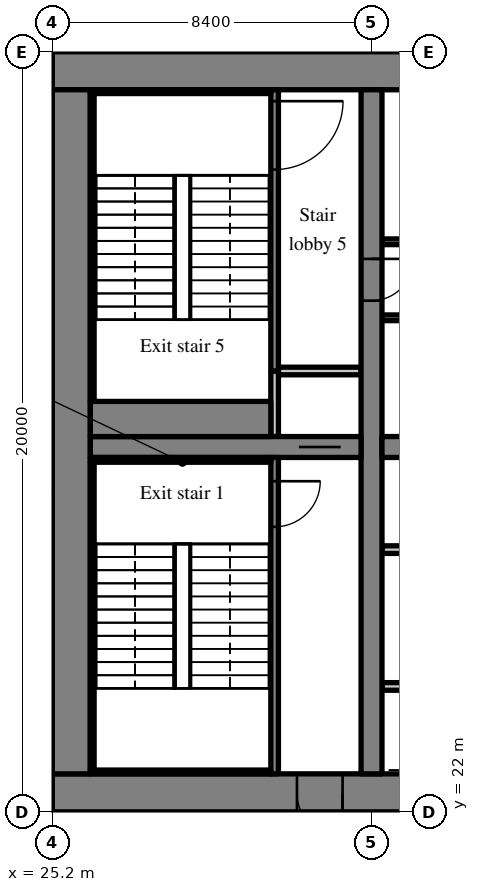
"""IFC4 building model, lengths in metres.
Left out: names, types, materials, properties, quantities, classifications, styles, units other than length and angle.
Written with IfcOpenShell. Run it as: python <this file> out.ifc"""

import sys

from ifc_helpers import new_model, si_unit, direction, frame, frame_2d, origin, place, context, subcontext, project, spatial, rectangle, extrude, source, transform, mapped, element, fill, save


model = new_model("IFC4")
c1 = context("Model", 3, precision=1e-05, world=origin(), true_north=direction((0.0, 1.0)))
c2 = subcontext(c1, "Body", "Model", "MODEL_VIEW")
j1 = project(units=[si_unit("LENGTHUNIT", "METRE"), si_unit("PLANEANGLEUNIT", "RADIAN")], contexts=[c1])
p1 = place(None, origin())
s1 = spatial("IfcSite", under=j1, at=p1, CompositionType="ELEMENT")
p2 = place(p1, origin())
s2 = spatial("IfcBuilding", under=s1, at=p2, CompositionType="ELEMENT")
p3 = place(p2, frame((0.0, 0.0, 54.4)))
s3 = spatial("IfcBuildingStorey", under=s2, at=p3, CompositionType="ELEMENT", Elevation=54.4)
m1 = source(origin(), c2, "Body", "SweptSolid", [
    extrude(rectangle(XDim=50.4, YDim=1.0, at=frame_2d((25.2, 0.0))), origin(), (0.0, 0.0, 1.0), 3.52),
])
p4 = place(p3, frame((25.2, 22.5, 0.0), z_axis=(0.0, 0.0, 1.0), x_axis=(1.0, 0.0, 0.0)))
e1 = element("IfcWall", 1, at=p4, inside=s3, PredefinedType="SHEAR", context=c2, shape_type="MappedRepresentation", body=[
    mapped(m1, transform((0.0, 0.0, 0.0), scale=1.0)),
])
m2 = source(origin(), c2, "Body", "SweptSolid", [
    extrude(rectangle(XDim=1.8, YDim=2.1, at=frame_2d((0.9, 1.05))), frame((0.0, 0.51, 0.0), z_axis=(0.0, -1.0, 0.0), x_axis=(1.0, 0.0, 0.0)), (0.0, 0.0, 1.0), 1.02),
])
p5 = place(p4, frame((15.9, 0.0, 0.0)))
e2 = element("IfcOpeningElement", 2, at=p5, cuts=e1, PredefinedType="OPENING", context=c2, shape_type="MappedRepresentation", body=[
    mapped(m2, transform((0.0, 0.0, 0.0), scale=1.0)),
])
m3 = source(origin(), c2, "Body", "SweptSolid", [
    extrude(rectangle(XDim=1.2, YDim=2.1, at=frame_2d((0.6, 1.05))), frame((0.0, 0.51, 0.0), z_axis=(0.0, -1.0, 0.0), x_axis=(1.0, 0.0, 0.0)), (0.0, 0.0, 1.0), 1.02),
])
p6 = place(p4, frame((26.987, 0.0, 0.0)))
e3 = element("IfcOpeningElement", 3, at=p6, cuts=e1, PredefinedType="OPENING", context=c2, shape_type="MappedRepresentation", body=[
    mapped(m3, transform((0.0, 0.0, 0.0), scale=1.0)),
])
m4 = source(origin(), c2, "Body", "SweptSolid", [
    extrude(rectangle(XDim=0.9, YDim=2.1, at=frame_2d((0.45, 1.05))), frame((0.0, 0.51, 0.0), z_axis=(0.0, -1.0, 0.0), x_axis=(1.0, 0.0, 0.0)), (0.0, 0.0, 1.0), 1.02),
])
p7 = place(p4, frame((33.75, 0.0, 0.0)))
e4 = element("IfcOpeningElement", 4, at=p7, cuts=e1, PredefinedType="OPENING", context=c2, shape_type="MappedRepresentation", body=[
    mapped(m4, transform((0.0, 0.0, 0.0), scale=1.0)),
])
p8 = place(p4, frame((30.75, 0.0, 0.0)))
e5 = element("IfcOpeningElement", 5, at=p8, cuts=e1, PredefinedType="OPENING", context=c2, shape_type="MappedRepresentation", body=[
    mapped(m4, transform((0.0, 0.0, 0.0), scale=1.0)),
])
p9 = place(p4, frame((38.262, 0.0, 0.0)))
e6 = element("IfcOpeningElement", 6, at=p9, cuts=e1, PredefinedType="OPENING", context=c2, shape_type="MappedRepresentation", body=[
    mapped(m4, transform((0.0, 0.0, 0.0), scale=1.0)),
])
p10 = place(p4, frame((6.438, 0.0, 0.0)))
e7 = element("IfcOpeningElement", 7, at=p10, cuts=e1, PredefinedType="OPENING", context=c2, shape_type="MappedRepresentation", body=[
    mapped(m3, transform((0.0, 0.0, 0.0), scale=1.0)),
])
p11 = place(p4, frame((47.725, 0.0, 0.0)))
e8 = element("IfcOpeningElement", 8, at=p11, cuts=e1, PredefinedType="OPENING", context=c2, shape_type="MappedRepresentation", body=[
    mapped(m3, transform((0.0, 0.0, 0.0), scale=1.0)),
])
p12 = place(p3, frame((25.2, 41.5, 0.0), z_axis=(0.0, 0.0, 1.0), x_axis=(1.0, 0.0, 0.0)))
e9 = element("IfcWall", 9, at=p12, inside=s3, PredefinedType="SHEAR", context=c2, shape_type="MappedRepresentation", body=[
    mapped(m1, transform((0.0, 0.0, 0.0), scale=1.0)),
])
m5 = source(origin(), c2, "Body", "SweptSolid", [
    extrude(rectangle(XDim=18.0, YDim=1.0, at=frame_2d((9.0, 0.0))), origin(), (0.0, 0.0, 1.0), 3.52),
])
p13 = place(p3, frame((25.7, 23.0, 0.0), z_axis=(0.0, 0.0, 1.0), x_axis=(0.0, 1.0, 0.0)))
e10 = element("IfcWall", 10, at=p13, inside=s3, PredefinedType="SHEAR", context=c2, shape_type="MappedRepresentation", body=[
    mapped(m5, transform((0.0, 0.0, 0.0), scale=1.0)),
])
m6 = source(origin(), c2, "Body", "SweptSolid", [
    extrude(rectangle(XDim=18.0, YDim=0.55, at=frame_2d((9.0, 0.0))), origin(), (0.0, 0.0, 1.0), 3.52),
])
p14 = place(p3, frame((33.6, 23.0, 0.0), z_axis=(0.0, 0.0, 1.0), x_axis=(0.0, 1.0, 0.0)))
e11 = element("IfcWall", 11, at=p14, inside=s3, PredefinedType="SHEAR", context=c2, shape_type="MappedRepresentation", body=[
    mapped(m6, transform((0.0, 0.0, 0.0), scale=1.0)),
])
m7 = source(origin(), c2, "Body", "SweptSolid", [
    extrude(rectangle(XDim=1.1, YDim=2.1, at=frame_2d((0.55, 1.05))), frame((0.0, 0.285, 0.0), z_axis=(0.0, -1.0, 0.0), x_axis=(1.0, 0.0, 0.0)), (0.0, 0.0, 1.0), 0.57),
])
p15 = place(p14, frame((12.45, 0.0, 0.0)))
e12 = element("IfcOpeningElement", 12, at=p15, cuts=e11, PredefinedType="OPENING", context=c2, shape_type="MappedRepresentation", body=[
    mapped(m7, transform((0.0, 0.0, 0.0), scale=1.0)),
])
m8 = source(origin(), c2, "Body", "SweptSolid", [
    extrude(rectangle(XDim=7.125, YDim=0.55, at=frame_2d((3.562, 0.0))), origin(), (0.0, 0.0, 1.0), 3.52),
])
p16 = place(p3, frame((26.2, 31.6, 0.0), z_axis=(0.0, 0.0, 1.0), x_axis=(1.0, 0.0, 0.0)))
e13 = element("IfcWall", 13, at=p16, inside=s3, PredefinedType="SHEAR", context=c2, shape_type="MappedRepresentation", body=[
    mapped(m8, transform((0.0, 0.0, 0.0), scale=1.0)),
])
p17 = place(p16, frame((5.488, 0.0, 0.0)))
e14 = element("IfcOpeningElement", 14, at=p17, cuts=e13, PredefinedType="OPENING", context=c2, shape_type="MappedRepresentation", body=[
    mapped(m7, transform((0.0, 0.0, 0.0), scale=1.0)),
])
m9 = source(origin(), c2, "Body", "SweptSolid", [
    extrude(rectangle(XDim=16.25, YDim=0.55, at=frame_2d((8.125, 0.0))), origin(), (0.0, 0.0, 1.0), 3.52),
])
p18 = place(p3, frame((33.875, 31.6, 0.0), z_axis=(0.0, 0.0, 1.0), x_axis=(1.0, 0.0, 0.0)))
e15 = element("IfcWall", 15, at=p18, inside=s3, PredefinedType="SHEAR", context=c2, shape_type="MappedRepresentation", body=[
    mapped(m9, transform((0.0, 0.0, 0.0), scale=1.0)),
])
m10 = source(origin(), c2, "Body", "SweptSolid", [
    extrude(rectangle(XDim=1.0, YDim=2.1, at=frame_2d((0.5, 1.05))), frame((0.0, 0.285, 0.0), z_axis=(0.0, -1.0, 0.0), x_axis=(1.0, 0.0, 0.0)), (0.0, 0.0, 1.0), 0.57),
])
p19 = place(p18, frame((14.687, 0.0, 0.0)))
e16 = element("IfcOpeningElement", 16, at=p19, cuts=e15, PredefinedType="OPENING", context=c2, shape_type="MappedRepresentation", body=[
    mapped(m10, transform((0.0, 0.0, 0.0), scale=1.0)),
])
m11 = source(origin(), c2, "Body", "SweptSolid", [
    extrude(rectangle(XDim=3.559, YDim=0.3, at=frame_2d((1.78, 0.0))), origin(), (0.0, 0.0, 1.0), 3.52),
])
p20 = place(p3, frame((25.55, 39.969, 0.0), z_axis=(0.0, 0.0, 1.0), x_axis=(-0.35779745313, 0.933799219604, 0.0)))
e17 = element("IfcWall", 17, at=p20, inside=s3, PredefinedType="SOLIDWALL", context=c2, shape_type="MappedRepresentation", body=[
    mapped(m11, transform((0.0, 0.0, 0.0), scale=1.0)),
])
m12 = source(origin(), c2, "Body", "SweptSolid", [
    extrude(rectangle(XDim=1.5, YDim=2.0, at=frame_2d((0.75, 1.0))), frame((0.0, 0.16, 0.0), z_axis=(0.0, -1.0, 0.0), x_axis=(1.0, 0.0, 0.0)), (0.0, 0.0, 1.0), 0.32),
])
p21 = place(p20, frame((1.903, 0.0, 0.9)))
e18 = element("IfcOpeningElement", 18, at=p21, cuts=e17, PredefinedType="OPENING", context=c2, shape_type="MappedRepresentation", body=[
    mapped(m12, transform((0.0, 0.0, 0.0), scale=1.0)),
])
m13 = source(origin(), c2, "Body", "SweptSolid", [
    extrude(rectangle(XDim=6.025, YDim=0.2, at=frame_2d((3.012, 0.0))), origin(), (0.0, 0.0, 1.0), 3.52),
])
p22 = place(p3, frame((33.875, 25.3, 0.0), z_axis=(0.0, 0.0, 1.0), x_axis=(1.0, 0.0, 0.0)))
e19 = element("IfcWall", 19, at=p22, inside=s3, PredefinedType="SOLIDWALL", context=c2, shape_type="MappedRepresentation", body=[
    mapped(m13, transform((0.0, 0.0, 0.0), scale=1.0)),
])
m14 = source(origin(), c2, "Body", "SweptSolid", [
    extrude(rectangle(XDim=1.1, YDim=2.1, at=frame_2d((0.55, 1.05))), frame((0.0, 0.11, 0.0), z_axis=(0.0, -1.0, 0.0), x_axis=(1.0, 0.0, 0.0)), (0.0, 0.0, 1.0), 0.22),
])
p23 = place(p22, frame((0.975, 0.0, 0.0)))
e20 = element("IfcOpeningElement", 20, at=p23, cuts=e19, PredefinedType="OPENING", context=c2, shape_type="MappedRepresentation", body=[
    mapped(m14, transform((0.0, 0.0, 0.0), scale=1.0)),
])
p24 = place(p22, frame((3.975, 0.0, 0.0)))
e21 = element("IfcOpeningElement", 21, at=p24, cuts=e19, PredefinedType="OPENING", context=c2, shape_type="MappedRepresentation", body=[
    mapped(m14, transform((0.0, 0.0, 0.0), scale=1.0)),
])
m15 = source(origin(), c2, "Body", "SweptSolid", [
    extrude(rectangle(XDim=12.025, YDim=0.2, at=frame_2d((6.012, 0.0))), origin(), (0.0, 0.0, 1.0), 3.52),
])
p25 = place(p3, frame((33.875, 28.9, 0.0), z_axis=(0.0, 0.0, 1.0), x_axis=(1.0, 0.0, 0.0)))
e22 = element("IfcWall", 22, at=p25, inside=s3, PredefinedType="SOLIDWALL", context=c2, shape_type="MappedRepresentation", body=[
    mapped(m15, transform((0.0, 0.0, 0.0), scale=1.0)),
])
p26 = place(p25, frame((0.975, 0.0, 0.0)))
e23 = element("IfcOpeningElement", 23, at=p26, cuts=e22, PredefinedType="OPENING", context=c2, shape_type="MappedRepresentation", body=[
    mapped(m14, transform((0.0, 0.0, 0.0), scale=1.0)),
])
p27 = place(p25, frame((3.975, 0.0, 0.0)))
e24 = element("IfcOpeningElement", 24, at=p27, cuts=e22, PredefinedType="OPENING", context=c2, shape_type="MappedRepresentation", body=[
    mapped(m14, transform((0.0, 0.0, 0.0), scale=1.0)),
])
p28 = place(p25, frame((6.975, 0.0, 0.0)))
e25 = element("IfcOpeningElement", 25, at=p28, cuts=e22, PredefinedType="OPENING", context=c2, shape_type="MappedRepresentation", body=[
    mapped(m14, transform((0.0, 0.0, 0.0), scale=1.0)),
])
p29 = place(p25, frame((9.975, 0.0, 0.0)))
e26 = element("IfcOpeningElement", 26, at=p29, cuts=e22, PredefinedType="OPENING", context=c2, shape_type="MappedRepresentation", body=[
    mapped(m14, transform((0.0, 0.0, 0.0), scale=1.0)),
])
m16 = source(origin(), c2, "Body", "SweptSolid", [
    extrude(rectangle(XDim=14.125, YDim=0.15, at=frame_2d((7.062, 0.0))), origin(), (0.0, 0.0, 1.0), 3.52),
])
p30 = place(p3, frame((33.875, 35.0, 0.0), z_axis=(0.0, 0.0, 1.0), x_axis=(1.0, 0.0, 0.0)))
e27 = element("IfcWall", 27, at=p30, inside=s3, PredefinedType="PARTITIONING", context=c2, shape_type="MappedRepresentation", body=[
    mapped(m16, transform((0.0, 0.0, 0.0), scale=1.0)),
])
m17 = source(origin(), c2, "Body", "SweptSolid", [
    extrude(rectangle(XDim=0.9, YDim=2.1, at=frame_2d((0.45, 1.05))), frame((0.0, 0.085, 0.0), z_axis=(0.0, -1.0, 0.0), x_axis=(1.0, 0.0, 0.0)), (0.0, 0.0, 1.0), 0.17),
])
p31 = place(p30, frame((6.575, 0.0, 0.0)))
e28 = element("IfcOpeningElement", 28, at=p31, cuts=e27, PredefinedType="OPENING", context=c2, shape_type="MappedRepresentation", body=[
    mapped(m17, transform((0.0, 0.0, 0.0), scale=1.0)),
])
m18 = source(origin(), c2, "Body", "SweptSolid", [
    extrude(rectangle(XDim=16.25, YDim=0.15, at=frame_2d((8.125, 0.0))), origin(), (0.0, 0.0, 1.0), 3.52),
])
p32 = place(p3, frame((33.875, 37.0, 0.0), z_axis=(0.0, 0.0, 1.0), x_axis=(1.0, 0.0, 0.0)))
e29 = element("IfcWall", 29, at=p32, inside=s3, PredefinedType="PARTITIONING", context=c2, shape_type="MappedRepresentation", body=[
    mapped(m18, transform((0.0, 0.0, 0.0), scale=1.0)),
])
p33 = place(p32, frame((0.769, 0.0, 0.0)))
e30 = element("IfcOpeningElement", 30, at=p33, cuts=e29, PredefinedType="OPENING", context=c2, shape_type="MappedRepresentation", body=[
    mapped(m17, transform((0.0, 0.0, 0.0), scale=1.0)),
])
p34 = place(p32, frame((3.613, 0.0, 0.0)))
e31 = element("IfcOpeningElement", 31, at=p34, cuts=e29, PredefinedType="OPENING", context=c2, shape_type="MappedRepresentation", body=[
    mapped(m17, transform((0.0, 0.0, 0.0), scale=1.0)),
])
p35 = place(p32, frame((9.3, 0.0, 0.0)))
e32 = element("IfcOpeningElement", 32, at=p35, cuts=e29, PredefinedType="OPENING", context=c2, shape_type="MappedRepresentation", body=[
    mapped(m17, transform((0.0, 0.0, 0.0), scale=1.0)),
])
p36 = place(p32, frame((14.581, 0.0, 0.0)))
e33 = element("IfcOpeningElement", 33, at=p36, cuts=e29, PredefinedType="OPENING", context=c2, shape_type="MappedRepresentation", body=[
    mapped(m17, transform((0.0, 0.0, 0.0), scale=1.0)),
])
m19 = source(origin(), c2, "Body", "SweptSolid", [
    extrude(rectangle(XDim=8.325, YDim=0.2, at=frame_2d((4.163, 0.0))), origin(), (0.0, 0.0, 1.0), 3.52),
])
p37 = place(p3, frame((31.05, 23.0, 0.0), z_axis=(0.0, 0.0, 1.0), x_axis=(0.0, 1.0, 0.0)))
e34 = element("IfcWall", 34, at=p37, inside=s3, PredefinedType="SOLIDWALL", context=c2, shape_type="MappedRepresentation", body=[
    mapped(m19, transform((0.0, 0.0, 0.0), scale=1.0)),
])
m20 = source(origin(), c2, "Body", "SweptSolid", [
    extrude(rectangle(XDim=1.2, YDim=2.1, at=frame_2d((0.6, 1.05))), frame((0.0, 0.11, 0.0), z_axis=(0.0, -1.0, 0.0), x_axis=(1.0, 0.0, 0.0)), (0.0, 0.0, 1.0), 0.22),
])
p38 = place(p37, frame((6.5, 0.0, 0.0)))
e35 = element("IfcOpeningElement", 35, at=p38, cuts=e34, PredefinedType="OPENING", context=c2, shape_type="MappedRepresentation", body=[
    mapped(m20, transform((0.0, 0.0, 0.0), scale=1.0)),
])
m21 = source(origin(), c2, "Body", "SweptSolid", [
    extrude(rectangle(XDim=1.725, YDim=0.2, at=frame_2d((0.863, 0.0))), origin(), (0.0, 0.0, 1.0), 3.52),
])
p39 = place(p3, frame((31.05, 31.875, 0.0), z_axis=(0.0, 0.0, 1.0), x_axis=(0.0, 1.0, 0.0)))
e36 = element("IfcWall", 36, at=p39, inside=s3, PredefinedType="SOLIDWALL", context=c2, shape_type="MappedRepresentation", body=[
    mapped(m21, transform((0.0, 0.0, 0.0), scale=1.0)),
])
m22 = source(origin(), c2, "Body", "SweptSolid", [
    extrude(rectangle(XDim=2.175, YDim=0.2, at=frame_2d((1.087, 0.0))), origin(), (0.0, 0.0, 1.0), 3.52),
])
p40 = place(p3, frame((31.15, 33.6, 0.0), z_axis=(0.0, 0.0, 1.0), x_axis=(1.0, 0.0, 0.0)))
e37 = element("IfcWall", 37, at=p40, inside=s3, PredefinedType="SOLIDWALL", context=c2, shape_type="MappedRepresentation", body=[
    mapped(m22, transform((0.0, 0.0, 0.0), scale=1.0)),
])
m23 = source(origin(), c2, "Body", "SweptSolid", [
    extrude(rectangle(XDim=7.4, YDim=0.2, at=frame_2d((3.7, 0.0))), origin(), (0.0, 0.0, 1.0), 3.52),
])
p41 = place(p3, frame((31.05, 33.6, 0.0), z_axis=(0.0, 0.0, 1.0), x_axis=(0.0, 1.0, 0.0)))
e38 = element("IfcWall", 38, at=p41, inside=s3, PredefinedType="SOLIDWALL", context=c2, shape_type="MappedRepresentation", body=[
    mapped(m23, transform((0.0, 0.0, 0.0), scale=1.0)),
])
m24 = source(origin(), c2, "Body", "SweptSolid", [
    extrude(rectangle(XDim=1.8, YDim=2.1, at=frame_2d((0.9, 1.05))), frame((0.0, 0.11, 0.0), z_axis=(0.0, -1.0, 0.0), x_axis=(1.0, 0.0, 0.0)), (0.0, 0.0, 1.0), 0.22),
])
p42 = place(p41, frame((5.3, 0.0, 0.0)))
e39 = element("IfcOpeningElement", 39, at=p42, cuts=e38, PredefinedType="OPENING", context=c2, shape_type="MappedRepresentation", body=[
    mapped(m24, transform((0.0, 0.0, 0.0), scale=1.0)),
])
m25 = source(origin(), c2, "Body", "SweptSolid", [
    extrude(rectangle(XDim=8.2, YDim=0.2, at=frame_2d((4.1, 0.0))), origin(), (0.0, 0.0, 1.0), 3.52),
])
p43 = place(p3, frame((17.0, 22.1, 0.0), z_axis=(0.0, 0.0, 1.0), x_axis=(1.0, 0.0, 0.0)))
e40 = element("IfcWall", 40, at=p43, inside=s3, PredefinedType="SOLIDWALL", context=c2, shape_type="MappedRepresentation", body=[
    mapped(m25, transform((0.0, 0.0, 0.0), scale=1.0)),
])
p44 = place(p43, frame((6.0, 0.0, 0.0)))
e41 = element("IfcOpeningElement", 41, at=p44, cuts=e40, PredefinedType="OPENING", context=c2, shape_type="MappedRepresentation", body=[
    mapped(m20, transform((0.0, 0.0, 0.0), scale=1.0)),
])
p45 = place(p3, frame((17.0, 30.4, 0.0), z_axis=(0.0, 0.0, 1.0), x_axis=(1.0, 0.0, 0.0)))
e42 = element("IfcWall", 42, at=p45, inside=s3, PredefinedType="SOLIDWALL", context=c2, shape_type="MappedRepresentation", body=[
    mapped(m25, transform((0.0, 0.0, 0.0), scale=1.0)),
])
m26 = source(origin(), c2, "Body", "SweptSolid", [
    extrude(rectangle(XDim=1.0, YDim=2.1, at=frame_2d((0.5, 1.05))), frame((0.0, 0.11, 0.0), z_axis=(0.0, -1.0, 0.0), x_axis=(1.0, 0.0, 0.0)), (0.0, 0.0, 1.0), 0.22),
])
p46 = place(p45, frame((6.1, 0.0, 0.0)))
e43 = element("IfcOpeningElement", 43, at=p46, cuts=e42, PredefinedType="OPENING", context=c2, shape_type="MappedRepresentation", body=[
    mapped(m26, transform((0.0, 0.0, 0.0), scale=1.0)),
])
m27 = source(origin(), c2, "Body", "SweptSolid", [
    extrude(rectangle(XDim=4.75, YDim=0.1, at=frame_2d((2.375, 0.0))), origin(), (0.0, 0.0, 1.0), 3.52),
])
p47 = place(p3, frame((26.2, 23.05, 0.0), z_axis=(0.0, 0.0, 1.0), x_axis=(1.0, 0.0, 0.0)))
e44 = element("IfcWall", 44, at=p47, inside=s3, PredefinedType="SOLIDWALL", context=c2, shape_type="MappedRepresentation", body=[
    mapped(m27, transform((0.0, 0.0, 0.0), scale=1.0)),
])
m28 = source(origin(), c2, "Body", "SweptSolid", [
    extrude(rectangle(XDim=4.75, YDim=0.125, at=frame_2d((2.375, 0.0))), origin(), (0.0, 0.0, 1.0), 3.52),
])
p48 = place(p3, frame((26.2, 31.262, 0.0), z_axis=(0.0, 0.0, 1.0), x_axis=(1.0, 0.0, 0.0)))
e45 = element("IfcWall", 45, at=p48, inside=s3, PredefinedType="SOLIDWALL", context=c2, shape_type="MappedRepresentation", body=[
    mapped(m28, transform((0.0, 0.0, 0.0), scale=1.0)),
])
m29 = source(origin(), c2, "Body", "SweptSolid", [
    extrude(rectangle(XDim=8.1, YDim=0.1, at=frame_2d((4.05, 0.0))), origin(), (0.0, 0.0, 1.0), 3.52),
])
p49 = place(p3, frame((26.25, 23.1, 0.0), z_axis=(0.0, 0.0, 1.0), x_axis=(0.0, 1.0, 0.0)))
e46 = element("IfcWall", 46, at=p49, inside=s3, PredefinedType="SOLIDWALL", context=c2, shape_type="MappedRepresentation", body=[
    mapped(m29, transform((0.0, 0.0, 0.0), scale=1.0)),
])
p50 = place(p3, frame((26.2, 40.95, 0.0), z_axis=(0.0, 0.0, 1.0), x_axis=(1.0, 0.0, 0.0)))
e47 = element("IfcWall", 47, at=p50, inside=s3, PredefinedType="SOLIDWALL", context=c2, shape_type="MappedRepresentation", body=[
    mapped(m27, transform((0.0, 0.0, 0.0), scale=1.0)),
])
m30 = source(origin(), c2, "Body", "SweptSolid", [
    extrude(rectangle(XDim=4.75, YDim=0.925, at=frame_2d((2.375, 0.0))), origin(), (0.0, 0.0, 1.0), 3.52),
])
p51 = place(p3, frame((26.2, 32.337, 0.0), z_axis=(0.0, 0.0, 1.0), x_axis=(1.0, 0.0, 0.0)))
e48 = element("IfcWall", 48, at=p51, inside=s3, PredefinedType="SOLIDWALL", context=c2, shape_type="MappedRepresentation", body=[
    mapped(m30, transform((0.0, 0.0, 0.0), scale=1.0)),
])
p52 = place(p3, frame((26.25, 32.8, 0.0), z_axis=(0.0, 0.0, 1.0), x_axis=(0.0, 1.0, 0.0)))
e49 = element("IfcWall", 49, at=p52, inside=s3, PredefinedType="SOLIDWALL", context=c2, shape_type="MappedRepresentation", body=[
    mapped(m29, transform((0.0, 0.0, 0.0), scale=1.0)),
])
m31 = source(origin(), c2, "Body", "SweptSolid", [
    extrude(rectangle(XDim=1.2, YDim=2.1, at=frame_2d((0.6, 1.05))), frame((0.0, 0.025, 0.0), z_axis=(0.0, -1.0, 0.0), x_axis=(1.0, 0.0, 0.0)), (0.0, 0.0, 1.0), 0.05),
])
p53 = place(p38, origin())
e50 = element("IfcDoor", 50, at=p53, inside=s3, OperationType="SINGLE_SWING_RIGHT", PredefinedType="DOOR", context=c2, shape_type="MappedRepresentation", body=[
    mapped(m31, transform((0.0, 0.0, 0.0), scale=1.0)),
])
fill(e35, e50)
m32 = source(origin(), c2, "Body", "SweptSolid", [
    extrude(rectangle(XDim=1.2, YDim=2.1, at=frame_2d((0.6, 1.05))), frame((0.0, 0.375, 0.0), z_axis=(0.0, -1.0, 0.0), x_axis=(1.0, 0.0, 0.0)), (0.0, 0.0, 1.0), 0.05),
])
p54 = place(p10, origin())
e51 = element("IfcDoor", 51, at=p54, inside=s3, OperationType="SINGLE_SWING_RIGHT", PredefinedType="DOOR", context=c2, shape_type="MappedRepresentation", body=[
    mapped(m32, transform((0.0, 0.0, 0.0), scale=1.0)),
])
fill(e7, e51)
m33 = source(origin(), c2, "Body", "SweptSolid", [
    extrude(rectangle(XDim=1.1, YDim=2.1, at=frame_2d((0.55, 1.05))), frame((0.0, 0.025, 0.0), z_axis=(0.0, -1.0, 0.0), x_axis=(1.0, 0.0, 0.0)), (0.0, 0.0, 1.0), 0.05),
])
p55 = place(p17, origin())
e52 = element("IfcDoor", 52, at=p55, inside=s3, OperationType="SLIDING_TO_LEFT", PredefinedType="DOOR", context=c2, shape_type="MappedRepresentation", body=[
    mapped(m33, transform((0.0, 0.0, 0.0), scale=1.0)),
])
fill(e14, e52)
m34 = source(origin(), c2, "Body", "SweptSolid", [
    extrude(rectangle(XDim=1.8, YDim=2.1, at=frame_2d((0.9, 1.05))), frame((0.0, 0.025, 0.0), z_axis=(0.0, -1.0, 0.0), x_axis=(1.0, 0.0, 0.0)), (0.0, 0.0, 1.0), 0.05),
])
p56 = place(p42, origin())
e53 = element("IfcDoor", 53, at=p56, inside=s3, OperationType="SINGLE_SWING_RIGHT", PredefinedType="DOOR", context=c2, shape_type="MappedRepresentation", body=[
    mapped(m34, transform((0.0, 0.0, 0.0), scale=1.0)),
])
fill(e39, e53)
p57 = place(p15, origin())
e54 = element("IfcDoor", 54, at=p57, inside=s3, OperationType="SINGLE_SWING_RIGHT", PredefinedType="DOOR", context=c2, shape_type="MappedRepresentation", body=[
    mapped(m33, transform((0.0, 0.0, 0.0), scale=1.0)),
])
fill(e12, e54)
save(model, sys.argv[1])
